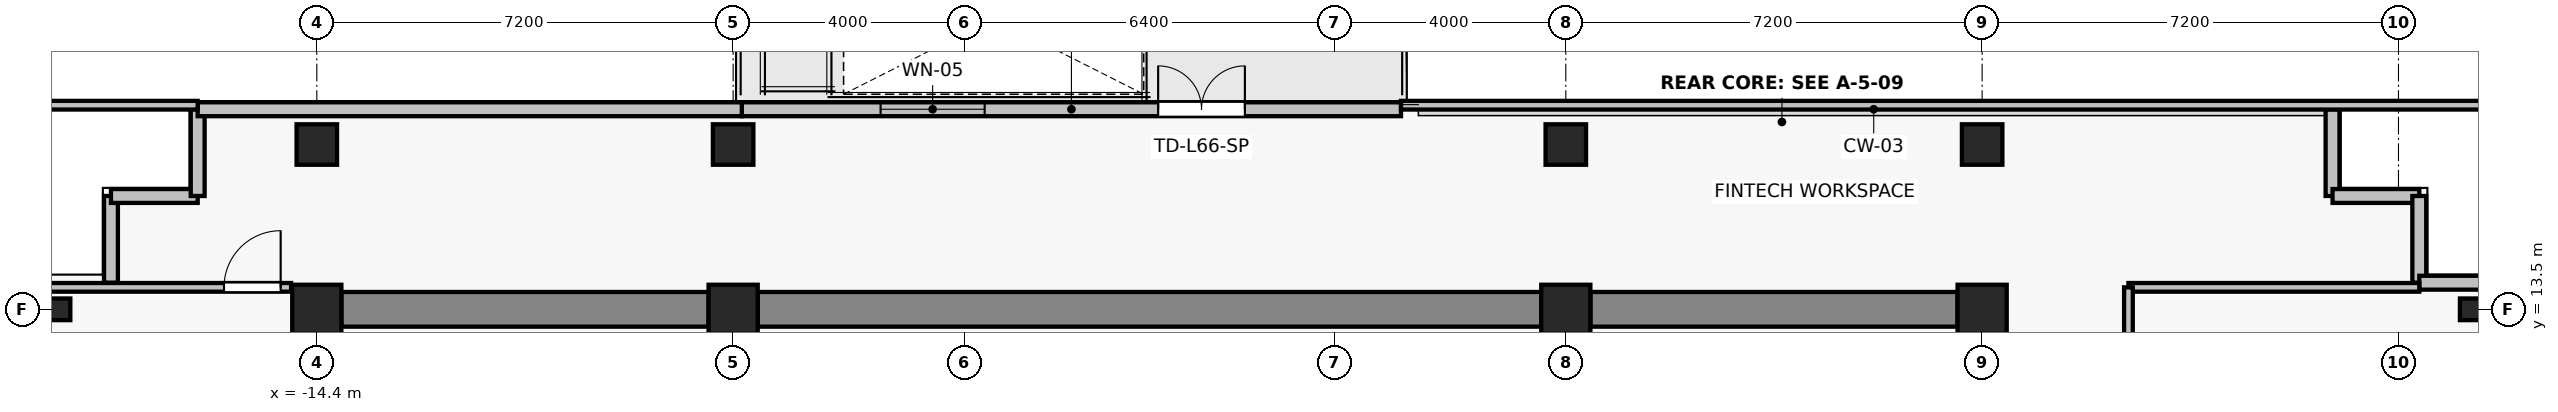
"""IFC4 building model, lengths in metres.
Left out: names, types, materials, properties, quantities, classifications, styles, units other than length and angle.
Written with IfcOpenShell. Run it as: python <this file> out.ifc"""

import sys

from ifc_helpers import new_model, si_unit, direction, frame, frame_2d, origin, origin_2d, place, context, subcontext, project, spatial, rectangle, i_section, extrude, source, transform, mapped, element, fill, save


model = new_model("IFC4")
c1 = context("Model", 3, precision=1e-05, world=origin(), true_north=direction((0.0, 1.0)))
c2 = subcontext(c1, "Body", "Model", "MODEL_VIEW")
j1 = project(units=[si_unit("LENGTHUNIT", "METRE"), si_unit("PLANEANGLEUNIT", "RADIAN")], contexts=[c1])
p1 = place(None, origin())
s1 = spatial("IfcSite", under=j1, at=p1, CompositionType="ELEMENT")
p2 = place(p1, origin())
s2 = spatial("IfcBuilding", under=s1, at=p2, CompositionType="ELEMENT")
p3 = place(p2, frame((0.0, 0.0, 235.3)))
s3 = spatial("IfcBuildingStorey", under=s2, at=p3, CompositionType="ELEMENT", Elevation=235.3)
for number, where, z_axis, x_axis in (
    (1, (-14.4, 13.5, 0.0), (0.0, 0.0, 1.0), (1.0, 0.0, 0.0)),
    (2, (-7.2, 13.5, 0.0), (0.0, 0.0, 1.0), (1.0, 0.0, 0.0)),
    (3, (7.2, 13.5, 0.0), (0.0, 0.0, 1.0), (1.0, 0.0, 0.0)),
    (4, (14.4, 13.5, 0.0), (0.0, 0.0, 1.0), (1.0, 0.0, 0.0)),
):
    element("IfcColumn", number, at=place(p3, frame(where, z_axis=z_axis, x_axis=x_axis)), inside=s3, PredefinedType="COLUMN", context=c2, shape_type="SweptSolid", body=[
        extrude(rectangle(XDim=0.85, YDim=0.85, at=origin_2d()), origin(), (0.0, 0.0, 1.0), 3.3),
    ])
for number, where, z_axis, x_axis in (
    (5, (-14.4, 16.35, 0.0), (0.0, 0.0, 1.0), (1.0, 0.0, 0.0)),
    (6, (-7.2, 16.35, 0.0), (0.0, 0.0, 1.0), (1.0, 0.0, 0.0)),
    (7, (7.2, 16.35, 0.0), (0.0, 0.0, 1.0), (1.0, 0.0, 0.0)),
    (8, (14.4, 16.35, 0.0), (0.0, 0.0, 1.0), (1.0, 0.0, 0.0)),
):
    element("IfcColumn", number, at=place(p3, frame(where, z_axis=z_axis, x_axis=x_axis)), inside=s3, PredefinedType="COLUMN", context=c2, shape_type="SweptSolid", body=[
        extrude(rectangle(XDim=0.7, YDim=0.7, at=origin_2d()), origin(), (0.0, 0.0, 1.0), 3.3),
    ])
for number, where, z_axis, x_axis in (
    (9, (-18.85, 13.5, 0.0), (0.0, 0.0, 1.0), (1.0, 0.0, 0.0)),
    (10, (22.85, 13.5, 0.0), (0.0, 0.0, 1.0), (1.0, 0.0, 0.0)),
):
    element("IfcColumn", number, at=place(p3, frame(where, z_axis=z_axis, x_axis=x_axis)), inside=s3, PredefinedType="COLUMN", context=c2, shape_type="SweptSolid", body=[
        extrude(i_section(OverallWidth=0.375, OverallDepth=0.375, WebThickness=0.017, FlangeThickness=0.027, FilletRadius=0.015, at=origin_2d()), origin(), (0.0, 0.0, 1.0), 3.3),
    ])
p4 = place(p3, frame((-13.975, 13.5, 0.0), z_axis=(0.0, 0.0, 1.0), x_axis=(1.0, 0.0, 0.0)))
e11 = element("IfcWall", 11, at=p4, inside=s3, PredefinedType="SHEAR", context=c2, shape_type="SweptSolid", body=[
    extrude(rectangle(XDim=6.35, YDim=0.6, at=frame_2d((3.175, 0.0))), origin(), (0.0, 0.0, 1.0), 3.075),
])
p5 = place(p3, frame((-6.775, 13.5, 0.0), z_axis=(0.0, 0.0, 1.0), x_axis=(1.0, 0.0, 0.0)))
e12 = element("IfcWall", 12, at=p5, inside=s3, PredefinedType="SHEAR", context=c2, shape_type="SweptSolid", body=[
    extrude(rectangle(XDim=13.55, YDim=0.6, at=frame_2d((6.775, 0.0))), origin(), (0.0, 0.0, 1.0), 3.075),
])
p6 = place(p3, frame((7.625, 13.5, 0.0), z_axis=(0.0, 0.0, 1.0), x_axis=(1.0, 0.0, 0.0)))
e13 = element("IfcWall", 13, at=p6, inside=s3, PredefinedType="SHEAR", context=c2, shape_type="SweptSolid", body=[
    extrude(rectangle(XDim=6.35, YDim=0.6, at=frame_2d((3.175, 0.0))), origin(), (0.0, 0.0, 1.0), 3.075),
])
p7 = place(p3, frame((-7.05, 16.96, 0.0), z_axis=(0.0, 0.0, 1.0), x_axis=(1.0, 0.0, 0.0)))
e14 = element("IfcWall", 14, at=p7, inside=s3, PredefinedType="SOLIDWALL", context=c2, shape_type="SweptSolid", body=[
    extrude(rectangle(XDim=11.4, YDim=0.24, at=frame_2d((5.7, 0.0))), origin(), (0.0, 0.0, 1.0), 3.075),
])
p8 = place(p7, frame((7.2, 0.0, 0.0)))
e15 = element("IfcOpeningElement", 15, at=p8, cuts=e14, PredefinedType="OPENING", context=c2, shape_type="SweptSolid", body=[
    extrude(rectangle(XDim=1.5, YDim=2.2, at=frame_2d((0.75, 1.1))), frame((0.0, 0.13, 0.0), z_axis=(0.0, -1.0, 0.0), x_axis=(1.0, 0.0, 0.0)), (0.0, 0.0, 1.0), 0.26),
])
p9 = place(p7, frame((2.4, 0.0, 0.85)))
e16 = element("IfcOpeningElement", 16, at=p9, cuts=e14, PredefinedType="OPENING", context=c2, shape_type="SweptSolid", body=[
    extrude(rectangle(XDim=1.8, YDim=1.6, at=frame_2d((0.9, 0.8))), frame((0.0, 0.13, 0.0), z_axis=(0.0, -1.0, 0.0), x_axis=(1.0, 0.0, 0.0)), (0.0, 0.0, 1.0), 0.26),
])
for number, where, z_axis, x_axis in (
    (17, (-17.96, 15.46, 0.0), (0.0, 0.0, 1.0), (0.0, -1.0, 0.0)),
    (18, (-16.46, 15.46, 0.0), (0.0, 0.0, 1.0), (-1.0, 0.0, 0.0)),
    (19, (-16.46, 16.96, 0.0), (0.0, 0.0, 1.0), (0.0, -1.0, 0.0)),
):
    element("IfcWall", number, at=place(p3, frame(where, z_axis=z_axis, x_axis=x_axis)), inside=s3, PredefinedType="SOLIDWALL", context=c2, shape_type="SweptSolid", body=[
        extrude(rectangle(XDim=1.5, YDim=0.24, at=frame_2d((0.75, 0.0))), origin(), (0.0, 0.0, 1.0), 3.075),
    ])
p10 = place(p3, frame((-7.05, 16.96, 0.0), z_axis=(0.0, 0.0, 1.0), x_axis=(-1.0, 0.0, 0.0)))
e20 = element("IfcWall", 20, at=p10, inside=s3, PredefinedType="SOLIDWALL", context=c2, shape_type="SweptSolid", body=[
    extrude(rectangle(XDim=9.41, YDim=0.24, at=frame_2d((4.705, 0.0))), origin(), (0.0, 0.0, 1.0), 3.075),
])
for number, where, z_axis, x_axis in (
    (21, (20.46, 15.46, 0.0), (0.0, 0.0, 1.0), (0.0, 1.0, 0.0)),
    (22, (21.96, 15.46, 0.0), (0.0, 0.0, 1.0), (-1.0, 0.0, 0.0)),
    (23, (21.96, 13.96, 0.0), (0.0, 0.0, 1.0), (0.0, 1.0, 0.0)),
    (24, (23.46, 13.96, 0.0), (0.0, 0.0, 1.0), (-1.0, 0.0, 0.0)),
):
    element("IfcWall", number, at=place(p3, frame(where, z_axis=z_axis, x_axis=x_axis)), inside=s3, PredefinedType="SOLIDWALL", context=c2, shape_type="SweptSolid", body=[
        extrude(rectangle(XDim=1.5, YDim=0.24, at=frame_2d((0.75, 0.0))), origin(), (0.0, 0.0, 1.0), 3.075),
    ])
p11 = place(p3, frame((-19.53, 13.88, 0.0), z_axis=(0.0, 0.0, 1.0), x_axis=(1.0, 0.0, 0.0)))
e25 = element("IfcWall", 25, at=p11, inside=s3, PredefinedType="PARTITIONING", context=c2, shape_type="SweptSolid", body=[
    extrude(rectangle(XDim=4.685, YDim=0.15, at=frame_2d((2.343, 0.0))), origin(), (0.0, 0.0, 1.0), 3.075),
])
p12 = place(p11, frame((3.525, 0.0, 0.0)))
e26 = element("IfcOpeningElement", 26, at=p12, cuts=e25, PredefinedType="OPENING", context=c2, shape_type="SweptSolid", body=[
    extrude(rectangle(XDim=0.98, YDim=2.15, at=frame_2d((0.49, 1.075))), frame((0.0, 0.085, 0.0), z_axis=(0.0, -1.0, 0.0), x_axis=(1.0, 0.0, 0.0)), (0.0, 0.0, 1.0), 0.17),
])
p13 = place(p3, frame((16.93, 13.88, 0.0), z_axis=(0.0, 0.0, 1.0), x_axis=(1.0, 0.0, 0.0)))
e27 = element("IfcWall", 27, at=p13, inside=s3, PredefinedType="PARTITIONING", context=c2, shape_type="SweptSolid", body=[
    extrude(rectangle(XDim=5.03, YDim=0.15, at=frame_2d((2.515, 0.0))), origin(), (0.0, 0.0, 1.0), 3.075),
])
p14 = place(p3, frame((16.93, -1.77, 0.0), z_axis=(0.0, 0.0, 1.0), x_axis=(0.0, 1.0, 0.0)))
e28 = element("IfcWall", 28, at=p14, inside=s3, PredefinedType="PARTITIONING", context=c2, shape_type="SweptSolid", body=[
    extrude(rectangle(XDim=15.65, YDim=0.15, at=frame_2d((7.825, 0.0))), origin(), (0.0, 0.0, 1.0), 2.615),
])
p15 = place(p14, frame((7.335, 0.0, 0.0)))
e29 = element("IfcOpeningElement", 29, at=p15, cuts=e28, PredefinedType="OPENING", context=c2, shape_type="SweptSolid", body=[
    extrude(rectangle(XDim=0.98, YDim=2.15, at=frame_2d((0.49, 1.075))), frame((0.0, 0.085, 0.0), z_axis=(0.0, -1.0, 0.0), x_axis=(1.0, 0.0, 0.0)), (0.0, 0.0, 1.0), 0.17),
])
p16 = place(p3, frame((4.35, 17.03, 0.0), z_axis=(0.0, 0.0, 1.0), x_axis=(1.0, 0.0, 0.0)))
e30 = element("IfcWall", 30, at=p16, inside=s3, PredefinedType="PARTITIONING", context=c2, shape_type="SweptSolid", body=[
    extrude(rectangle(XDim=19.18, YDim=0.15, at=frame_2d((9.59, 0.0))), origin(), (0.0, 0.0, 1.0), 3.075),
])
p17 = place(p3, frame((-19.53, 17.03, 0.0), z_axis=(0.0, 0.0, 1.0), x_axis=(1.0, 0.0, 0.0)))
e31 = element("IfcWall", 31, at=p17, inside=s3, PredefinedType="PARTITIONING", context=c2, shape_type="SweptSolid", body=[
    extrude(rectangle(XDim=3.07, YDim=0.15, at=frame_2d((1.535, 0.0))), origin(), (0.0, 0.0, 1.0), 3.075),
])
m1 = source(origin(), c2, "Body", "SweptSolid", [
    extrude(rectangle(XDim=1.5, YDim=2.2, at=frame_2d((0.75, 1.1))), frame((0.0, 0.025, 0.0), z_axis=(0.0, -1.0, 0.0), x_axis=(1.0, 0.0, 0.0)), (0.0, 0.0, 1.0), 0.05),
])
p18 = place(p8, origin())
e32 = element("IfcDoor", 32, at=p18, inside=s3, OperationType="DOUBLE_DOOR_SINGLE_SWING", PredefinedType="DOOR", context=c2, shape_type="MappedRepresentation", body=[
    mapped(m1, transform((0.0, 0.0, 0.0), x_axis=(1.0, 0.0, 0.0), y_axis=(0.0, 1.0, 0.0), z_axis=(0.0, 0.0, 1.0), scale=1.0)),
])
fill(e15, e32)
m2 = source(origin(), c2, "Body", "SweptSolid", [
    extrude(rectangle(XDim=1.8, YDim=1.6, at=frame_2d((0.9, 0.8))), frame((0.0, 0.03, 0.0), z_axis=(0.0, -1.0, 0.0), x_axis=(1.0, 0.0, 0.0)), (0.0, 0.0, 1.0), 0.06),
])
p19 = place(p9, origin())
e33 = element("IfcWindow", 33, at=p19, inside=s3, PartitioningType="SINGLE_PANEL", PredefinedType="WINDOW", context=c2, shape_type="MappedRepresentation", body=[
    mapped(m2, transform((0.0, 0.0, 0.0), x_axis=(1.0, 0.0, 0.0), y_axis=(0.0, 1.0, 0.0), z_axis=(0.0, 0.0, 1.0), scale=1.0)),
])
fill(e16, e33)
m3 = source(origin(), c2, "Body", "SweptSolid", [
    extrude(rectangle(XDim=0.98, YDim=2.15, at=frame_2d((0.49, 1.075))), frame((0.0, 0.025, 0.0), z_axis=(0.0, -1.0, 0.0), x_axis=(1.0, 0.0, 0.0)), (0.0, 0.0, 1.0), 0.05),
])
p20 = place(p12, origin())
e34 = element("IfcDoor", 34, at=p20, inside=s3, OperationType="SINGLE_SWING_RIGHT", PredefinedType="DOOR", context=c2, shape_type="MappedRepresentation", body=[
    mapped(m3, transform((0.0, 0.0, 0.0), x_axis=(1.0, 0.0, 0.0), y_axis=(0.0, 1.0, 0.0), z_axis=(0.0, 0.0, 1.0), scale=1.0)),
])
fill(e26, e34)
save(model, sys.argv[1])
